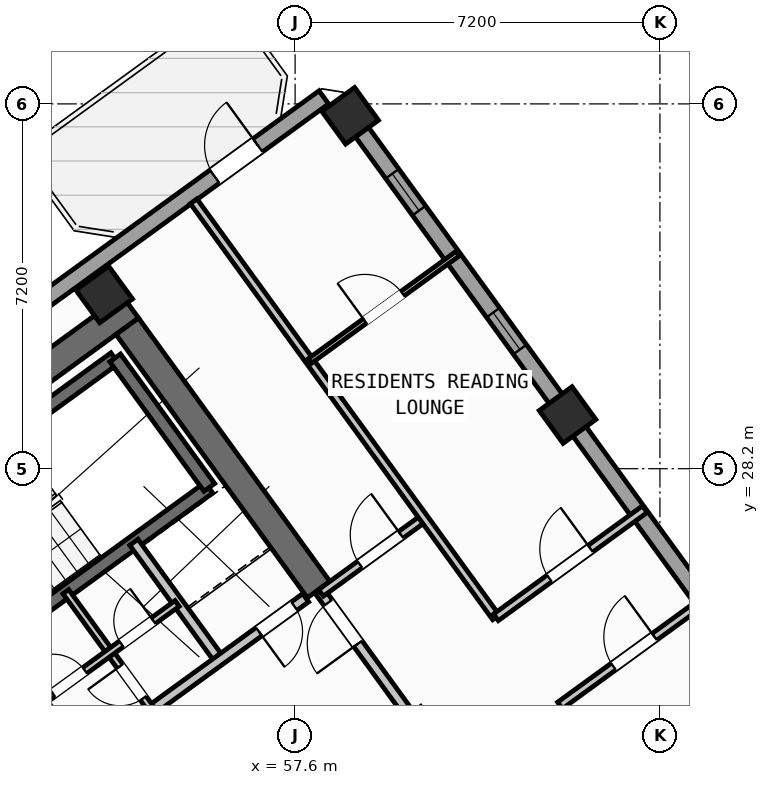
"""IFC4 building model, lengths in metres.
Left out: names, types, materials, properties, quantities, classifications, styles, units other than length and angle.
Written with IfcOpenShell. Run it as: python <this file> out.ifc"""

import sys

from ifc_helpers import new_model, si_unit, direction, frame, frame_2d, origin, origin_2d, place, context, subcontext, project, spatial, rectangle, hollow_rectangle, extrude, source, transform, mapped, element, fill, save


model = new_model("IFC4")
c1 = context("Model", 3, precision=1e-05, world=origin(), true_north=direction((0.0, 1.0)))
c2 = subcontext(c1, "Body", "Model", "MODEL_VIEW")
j1 = project(units=[si_unit("LENGTHUNIT", "METRE"), si_unit("PLANEANGLEUNIT", "RADIAN")], contexts=[c1])
p1 = place(None, origin())
s1 = spatial("IfcSite", under=j1, at=p1, CompositionType="ELEMENT")
p2 = place(p1, origin())
s2 = spatial("IfcBuilding", under=s1, at=p2, CompositionType="ELEMENT")
p3 = place(p2, frame((0.0, 0.0, 174.9)))
s3 = spatial("IfcBuildingStorey", under=s2, at=p3, CompositionType="ELEMENT", Elevation=174.9)
p4 = place(p3, frame((44.365, 24.142, 0.0), z_axis=(0.0, 0.0, 1.0), x_axis=(0.809024304885, 0.587775190107, 0.0)))
e1 = element("IfcWall", 1, at=p4, inside=s3, PredefinedType="SHEAR", context=c2, shape_type="SweptSolid", body=[
    extrude(rectangle(XDim=12.34, YDim=0.55, at=frame_2d((6.17, 0.0))), origin(), (0.0, 0.0, 1.0), 4.22),
])
p5 = place(p3, frame((58.064, 25.813, 0.0), z_axis=(0.0, 0.0, 1.0), x_axis=(-0.587764933797, 0.809031756236, 0.0)))
e2 = element("IfcWall", 2, at=p5, inside=s3, PredefinedType="SHEAR", context=c2, shape_type="SweptSolid", body=[
    extrude(rectangle(XDim=6.425, YDim=0.55, at=frame_2d((3.212, 0.0))), origin(), (0.0, 0.0, 1.0), 4.22),
])
m1 = source(origin(), c2, "Body", "SweptSolid", [
    extrude(hollow_rectangle(XDim=0.8, YDim=0.8, WallThickness=0.032, at=origin_2d()), origin(), (0.0, 0.0, 1.0), 4.5),
])
for number, where, z_axis, x_axis in (
    (3, (53.832, 31.638, 0.0), (0.0, 0.0, 1.0), (0.809, 0.588, 0.0)),
    (4, (62.977, 29.259, 0.0), (0.0, 0.0, 1.0), (0.809, 0.588, 0.0)),
    (5, (58.686, 35.165, 0.0), (0.0, 0.0, 1.0), (0.809, 0.588, 0.0)),
):
    element("IfcColumn", number, at=place(p3, frame(where, z_axis=z_axis, x_axis=x_axis)), inside=s3, PredefinedType="COLUMN", context=c2, shape_type="MappedRepresentation", body=[
        mapped(m1, transform((0.0, 0.0, 0.0), scale=1.0)),
    ])
p6 = place(p3, frame((43.938, 25.192, 0.0), z_axis=(0.0, 0.0, 1.0), x_axis=(0.809016324578, 0.587786174187, 0.0)))
e6 = element("IfcWall", 6, at=p6, inside=s3, PredefinedType="STANDARD", context=c2, shape_type="SweptSolid", body=[
    extrude(rectangle(XDim=17.587, YDim=0.32, at=frame_2d((8.794, 0.0))), origin(), (0.0, 0.0, 1.0), 4.22),
])
p7 = place(p6, frame((14.926, 0.0, 0.0)))
e7 = element("IfcOpeningElement", 7, at=p7, cuts=e6, PredefinedType="OPENING", context=c2, shape_type="SweptSolid", body=[
    extrude(rectangle(XDim=1.05, YDim=2.15, at=frame_2d((0.525, 1.075))), frame((0.0, 0.17, 0.0), z_axis=(0.0, -1.0, 0.0), x_axis=(1.0, 0.0, 0.0)), (0.0, 0.0, 1.0), 0.34),
])
p8 = place(p6, frame((2.606, 0.0, 0.8)))
e8 = element("IfcOpeningElement", 8, at=p8, cuts=e6, PredefinedType="OPENING", context=c2, shape_type="SweptSolid", body=[
    extrude(rectangle(XDim=2.1, YDim=1.55, at=frame_2d((1.05, 0.775))), frame((0.0, 0.17, 0.0), z_axis=(0.0, -1.0, 0.0), x_axis=(1.0, 0.0, 0.0)), (0.0, 0.0, 1.0), 0.34),
])
p9 = place(p6, frame((6.881, 0.0, 0.8)))
e9 = element("IfcOpeningElement", 9, at=p9, cuts=e6, PredefinedType="OPENING", context=c2, shape_type="SweptSolid", body=[
    extrude(rectangle(XDim=2.1, YDim=1.55, at=frame_2d((1.05, 0.775))), frame((0.0, 0.17, 0.0), z_axis=(0.0, -1.0, 0.0), x_axis=(1.0, 0.0, 0.0)), (0.0, 0.0, 1.0), 0.34),
])
p10 = place(p3, frame((58.455, 35.484, 0.0), z_axis=(0.0, 0.0, 1.0), x_axis=(0.587783625747, -0.809018176127, 0.0)))
e10 = element("IfcWall", 10, at=p10, inside=s3, PredefinedType="STANDARD", context=c2, shape_type="SweptSolid", body=[
    extrude(rectangle(XDim=21.587, YDim=0.32, at=frame_2d((10.794, 0.0))), origin(), (0.0, 0.0, 1.0), 2.395),
])
p11 = place(p10, frame((1.807, 0.0, 1.0)))
e11 = element("IfcOpeningElement", 11, at=p11, cuts=e10, PredefinedType="OPENING", context=c2, shape_type="SweptSolid", body=[
    extrude(rectangle(XDim=0.9, YDim=1.25, at=frame_2d((0.45, 0.625))), frame((0.0, 0.17, 0.0), z_axis=(0.0, -1.0, 0.0), x_axis=(1.0, 0.0, 0.0)), (0.0, 0.0, 1.0), 0.34),
])
p12 = place(p10, frame((5.195, 0.0, 1.0)))
e12 = element("IfcOpeningElement", 12, at=p12, cuts=e10, PredefinedType="OPENING", context=c2, shape_type="SweptSolid", body=[
    extrude(rectangle(XDim=0.9, YDim=1.25, at=frame_2d((0.45, 0.625))), frame((0.0, 0.17, 0.0), z_axis=(0.0, -1.0, 0.0), x_axis=(1.0, 0.0, 0.0)), (0.0, 0.0, 1.0), 0.34),
])
p13 = place(p10, frame((13.059, 0.0, 1.0)))
e13 = element("IfcOpeningElement", 13, at=p13, cuts=e10, PredefinedType="OPENING", context=c2, shape_type="SweptSolid", body=[
    extrude(rectangle(XDim=0.9, YDim=1.25, at=frame_2d((0.45, 0.625))), frame((0.0, 0.17, 0.0), z_axis=(0.0, -1.0, 0.0), x_axis=(1.0, 0.0, 0.0)), (0.0, 0.0, 1.0), 0.34),
])
p14 = place(p3, frame((48.006, 25.996, 0.0), z_axis=(0.0, 0.0, 1.0), x_axis=(0.80901903764, 0.587782439969, 0.0)))
e14 = element("IfcWall", 14, at=p14, inside=s3, PredefinedType="SHEAR", context=c2, shape_type="SweptSolid", body=[
    extrude(rectangle(XDim=7.46, YDim=0.26, at=frame_2d((3.73, 0.0))), origin(), (0.0, 0.0, 1.0), 4.22),
])
p15 = place(p3, frame((49.863, 23.44, 0.0), z_axis=(0.0, 0.0, 1.0), x_axis=(0.809003474932, 0.587803859759, 0.0)))
e15 = element("IfcWall", 15, at=p15, inside=s3, PredefinedType="SHEAR", context=c2, shape_type="SweptSolid", body=[
    extrude(rectangle(XDim=7.46, YDim=0.26, at=frame_2d((3.73, 0.0))), origin(), (0.0, 0.0, 1.0), 4.22),
])
p16 = place(p15, frame((0.36, 0.0, 0.0)))
e16 = element("IfcOpeningElement", 16, at=p16, cuts=e15, PredefinedType="OPENING", context=c2, shape_type="SweptSolid", body=[
    extrude(rectangle(XDim=0.86, YDim=2.05, at=frame_2d((0.43, 1.025))), frame((0.0, 0.14, 0.0), z_axis=(0.0, -1.0, 0.0), x_axis=(1.0, 0.0, 0.0)), (0.0, 0.0, 1.0), 0.28),
])
p17 = place(p3, frame((55.906, 27.831, 0.0), z_axis=(0.0, 0.0, 1.0), x_axis=(-0.587804123638, 0.809003283204, 0.0)))
e17 = element("IfcWall", 17, at=p17, inside=s3, PredefinedType="SHEAR", context=c2, shape_type="SweptSolid", body=[
    extrude(rectangle(XDim=3.16, YDim=0.26, at=frame_2d((1.58, 0.0))), origin(), (0.0, 0.0, 1.0), 4.22),
])
p18 = place(p3, frame((53.425, 22.468, 0.0), z_axis=(0.0, 0.0, 1.0), x_axis=(-0.5877230039, 0.809062216821, 0.0)))
e18 = element("IfcWall", 18, at=p18, inside=s3, PredefinedType="STANDARD", context=c2, shape_type="SweptSolid", body=[
    extrude(rectangle(XDim=2.88, YDim=0.2, at=frame_2d((1.44, 0.0))), origin(), (0.0, 0.0, 1.0), 4.21),
])
p19 = place(p3, frame((56.111, 24.419, 0.0), z_axis=(0.0, 0.0, 1.0), x_axis=(-0.58777848983, 0.809021907548, 0.0)))
e19 = element("IfcWall", 19, at=p19, inside=s3, PredefinedType="STANDARD", context=c2, shape_type="SweptSolid", body=[
    extrude(rectangle(XDim=2.88, YDim=0.2, at=frame_2d((1.44, 0.0))), origin(), (0.0, 0.0, 1.0), 4.21),
])
p20 = place(p3, frame((53.425, 22.468, 0.0), z_axis=(0.0, 0.0, 1.0), x_axis=(0.809024377198, 0.587775090574, 0.0)))
e20 = element("IfcWall", 20, at=p20, inside=s3, PredefinedType="STANDARD", context=c2, shape_type="SweptSolid", body=[
    extrude(rectangle(XDim=5.418, YDim=0.2, at=frame_2d((2.709, 0.0))), origin(), (0.0, 0.0, 1.0), 4.21),
])
p21 = place(p20, frame((4.28, 0.0, 0.0)))
e21 = element("IfcOpeningElement", 21, at=p21, cuts=e20, PredefinedType="OPENING", context=c2, shape_type="SweptSolid", body=[
    extrude(rectangle(XDim=0.86, YDim=2.05, at=frame_2d((0.43, 1.025))), frame((0.0, 0.11, 0.0), z_axis=(0.0, -1.0, 0.0), x_axis=(1.0, 0.0, 0.0)), (0.0, 0.0, 1.0), 0.22),
])
p22 = place(p20, frame((0.35, 0.0, 0.0)))
e22 = element("IfcOpeningElement", 22, at=p22, cuts=e20, PredefinedType="OPENING", context=c2, shape_type="SweptSolid", body=[
    extrude(rectangle(XDim=0.86, YDim=2.05, at=frame_2d((0.43, 1.025))), frame((0.0, 0.11, 0.0), z_axis=(0.0, -1.0, 0.0), x_axis=(1.0, 0.0, 0.0)), (0.0, 0.0, 1.0), 0.22),
])
p23 = place(p3, frame((54.768, 23.443, 0.0), z_axis=(0.0, 0.0, 1.0), x_axis=(-0.587736077749, 0.809052719489, 0.0)))
e23 = element("IfcWall", 23, at=p23, inside=s3, PredefinedType="PLUMBINGWALL", context=c2, shape_type="SweptSolid", body=[
    extrude(rectangle(XDim=1.4, YDim=0.14, at=frame_2d((0.7, 0.0))), origin(), (0.0, 0.0, 1.0), 4.21),
])
p24 = place(p23, frame((0.28, 0.0, 0.0)))
e24 = element("IfcOpeningElement", 24, at=p24, cuts=e23, PredefinedType="OPENING", context=c2, shape_type="SweptSolid", body=[
    extrude(rectangle(XDim=0.78, YDim=2.05, at=frame_2d((0.39, 1.025))), frame((0.0, 0.08, 0.0), z_axis=(0.0, -1.0, 0.0), x_axis=(1.0, 0.0, 0.0)), (0.0, 0.0, 1.0), 0.16),
])
p25 = place(p3, frame((53.945, 24.576, 0.0), z_axis=(0.0, 0.0, 1.0), x_axis=(-0.587897037186, 0.808935766095, 0.0)))
e25 = element("IfcWall", 25, at=p25, inside=s3, PredefinedType="PLUMBINGWALL", context=c2, shape_type="SweptSolid", body=[
    extrude(rectangle(XDim=1.48, YDim=0.14, at=frame_2d((0.74, 0.0))), origin(), (0.0, 0.0, 1.0), 4.21),
])
p26 = place(p3, frame((52.618, 23.612, 0.0), z_axis=(0.0, 0.0, 1.0), x_axis=(0.809009587469, 0.587795446889, 0.0)))
e26 = element("IfcWall", 26, at=p26, inside=s3, PredefinedType="PLUMBINGWALL", context=c2, shape_type="SweptSolid", body=[
    extrude(rectangle(XDim=3.28, YDim=0.14, at=frame_2d((1.64, 0.0))), origin(), (0.0, 0.0, 1.0), 4.21),
])
p27 = place(p26, frame((0.25, 0.0, 0.0)))
e27 = element("IfcOpeningElement", 27, at=p27, cuts=e26, PredefinedType="OPENING", context=c2, shape_type="SweptSolid", body=[
    extrude(rectangle(XDim=0.78, YDim=2.05, at=frame_2d((0.39, 1.025))), frame((0.0, 0.08, 0.0), z_axis=(0.0, -1.0, 0.0), x_axis=(1.0, 0.0, 0.0)), (0.0, 0.0, 1.0), 0.16),
])
p28 = place(p26, frame((1.92, 0.0, 0.0)))
e28 = element("IfcOpeningElement", 28, at=p28, cuts=e26, PredefinedType="OPENING", context=c2, shape_type="SweptSolid", body=[
    extrude(rectangle(XDim=0.78, YDim=2.05, at=frame_2d((0.39, 1.025))), frame((0.0, 0.08, 0.0), z_axis=(0.0, -1.0, 0.0), x_axis=(1.0, 0.0, 0.0)), (0.0, 0.0, 1.0), 0.16),
])
p29 = place(p3, frame((59.827, 23.386, 0.0), z_axis=(0.0, 0.0, 1.0), x_axis=(-0.587803840107, 0.809003489211, 0.0)))
e29 = element("IfcWall", 29, at=p29, inside=s3, PredefinedType="STANDARD", context=c2, shape_type="SweptSolid", body=[
    extrude(rectangle(XDim=2.96, YDim=0.2, at=frame_2d((1.48, 0.0))), origin(), (0.0, 0.0, 1.0), 2.395),
])
p30 = place(p29, frame((1.68, 0.0, 0.0)))
e30 = element("IfcOpeningElement", 30, at=p30, cuts=e29, PredefinedType="OPENING", context=c2, shape_type="SweptSolid", body=[
    extrude(rectangle(XDim=1.0, YDim=2.1, at=frame_2d((0.5, 1.05))), frame((0.0, 0.11, 0.0), z_axis=(0.0, -1.0, 0.0), x_axis=(1.0, 0.0, 0.0)), (0.0, 0.0, 1.0), 0.22),
])
p31 = place(p3, frame((58.111, 25.749, 0.0), z_axis=(0.0, 0.0, 1.0), x_axis=(0.809000999347, 0.58780726693, 0.0)))
e31 = element("IfcWall", 31, at=p31, inside=s3, PredefinedType="PARTITIONING", context=c2, shape_type="SweptSolid", body=[
    extrude(rectangle(XDim=2.51, YDim=0.16, at=frame_2d((1.255, 0.0))), origin(), (0.0, 0.0, 1.0), 3.695),
])
p32 = place(p31, frame((0.95, 0.0, 0.0)))
e32 = element("IfcOpeningElement", 32, at=p32, cuts=e31, PredefinedType="OPENING", context=c2, shape_type="SweptSolid", body=[
    extrude(rectangle(XDim=1.0, YDim=2.1, at=frame_2d((0.5, 1.05))), frame((0.0, 0.09, 0.0), z_axis=(0.0, -1.0, 0.0), x_axis=(1.0, 0.0, 0.0)), (0.0, 0.0, 1.0), 0.18),
])
p33 = place(p3, frame((68.353, 15.922, 0.0), z_axis=(0.0, 0.0, 1.0), x_axis=(-0.587784007866, 0.809017898502, 0.0)))
e33 = element("IfcWall", 33, at=p33, inside=s3, PredefinedType="PARTITIONING", context=c2, shape_type="SweptSolid", body=[
    extrude(rectangle(XDim=9.4, YDim=0.16, at=frame_2d((4.7, 0.0))), origin(), (0.0, 0.0, 1.0), 4.21),
])
p34 = place(p3, frame((61.564, 25.266, 0.0), z_axis=(0.0, 0.0, 1.0), x_axis=(-0.587792629712, 0.809011634314, 0.0)))
e34 = element("IfcWall", 34, at=p34, inside=s3, PredefinedType="PARTITIONING", context=c2, shape_type="SweptSolid", body=[
    extrude(rectangle(XDim=10.15, YDim=0.16, at=frame_2d((5.075, 0.0))), origin(), (0.0, 0.0, 1.0), 4.21),
])
p35 = place(p3, frame((62.828, 23.527, 0.0), z_axis=(0.0, 0.0, 1.0), x_axis=(0.809003564202, 0.587803736896, 0.0)))
e35 = element("IfcWall", 35, at=p35, inside=s3, PredefinedType="PARTITIONING", context=c2, shape_type="SweptSolid", body=[
    extrude(rectangle(XDim=3.63, YDim=0.16, at=frame_2d((1.815, 0.0))), origin(), (0.0, 0.0, 1.0), 4.21),
])
p36 = place(p35, frame((1.305, 0.0, 0.0)))
e36 = element("IfcOpeningElement", 36, at=p36, cuts=e35, PredefinedType="OPENING", context=c2, shape_type="SweptSolid", body=[
    extrude(rectangle(XDim=1.0, YDim=2.1, at=frame_2d((0.5, 1.05))), frame((0.0, 0.09, 0.0), z_axis=(0.0, -1.0, 0.0), x_axis=(1.0, 0.0, 0.0)), (0.0, 0.0, 1.0), 0.18),
])
p37 = place(p3, frame((61.564, 25.266, 0.0), z_axis=(0.0, 0.0, 1.0), x_axis=(0.809012309495, 0.587791700422, 0.0)))
e37 = element("IfcWall", 37, at=p37, inside=s3, PredefinedType="PARTITIONING", context=c2, shape_type="SweptSolid", body=[
    extrude(rectangle(XDim=3.63, YDim=0.16, at=frame_2d((1.815, 0.0))), origin(), (0.0, 0.0, 1.0), 4.21),
])
p38 = place(p37, frame((1.305, 0.0, 0.0)))
e38 = element("IfcOpeningElement", 38, at=p38, cuts=e37, PredefinedType="OPENING", context=c2, shape_type="SweptSolid", body=[
    extrude(rectangle(XDim=1.0, YDim=2.1, at=frame_2d((0.5, 1.05))), frame((0.0, 0.09, 0.0), z_axis=(0.0, -1.0, 0.0), x_axis=(1.0, 0.0, 0.0)), (0.0, 0.0, 1.0), 0.18),
])
p39 = place(p3, frame((57.889, 30.324, 0.0), z_axis=(0.0, 0.0, 1.0), x_axis=(0.809005039917, 0.58780170584, 0.0)))
e39 = element("IfcWall", 39, at=p39, inside=s3, PredefinedType="PARTITIONING", context=c2, shape_type="SweptSolid", body=[
    extrude(rectangle(XDim=3.61, YDim=0.11, at=frame_2d((1.805, 0.0))), origin(), (0.0, 0.0, 1.0), 4.21),
])
p40 = place(p39, frame((1.345, 0.0, 0.0)))
e40 = element("IfcOpeningElement", 40, at=p40, cuts=e39, PredefinedType="OPENING", context=c2, shape_type="SweptSolid", body=[
    extrude(rectangle(XDim=0.92, YDim=2.08, at=frame_2d((0.46, 1.04))), frame((0.0, 0.065, 0.0), z_axis=(0.0, -1.0, 0.0), x_axis=(1.0, 0.0, 0.0)), (0.0, 0.0, 1.0), 0.13),
])
m2 = source(origin(), c2, "Body", "SweptSolid", [
    extrude(rectangle(XDim=1.05, YDim=2.15, at=frame_2d((0.525, 1.075))), frame((0.0, 0.025, 0.0), z_axis=(0.0, -1.0, 0.0), x_axis=(1.0, 0.0, 0.0)), (0.0, 0.0, 1.0), 0.05),
])
p41 = place(p7, origin())
e41 = element("IfcDoor", 41, at=p41, inside=s3, OperationType="SINGLE_SWING_RIGHT", PredefinedType="DOOR", context=c2, shape_type="MappedRepresentation", body=[
    mapped(m2, transform((0.0, 0.0, 0.0), scale=1.0)),
])
fill(e7, e41)
m3 = source(origin(), c2, "Body", "SweptSolid", [
    extrude(rectangle(XDim=0.9, YDim=1.25, at=frame_2d((0.45, 0.625))), frame((0.0, 0.03, 0.0), z_axis=(0.0, -1.0, 0.0), x_axis=(1.0, 0.0, 0.0)), (0.0, 0.0, 1.0), 0.06),
])
p42 = place(p11, origin())
e42 = element("IfcWindow", 42, at=p42, inside=s3, PartitioningType="SINGLE_PANEL", PredefinedType="WINDOW", context=c2, shape_type="MappedRepresentation", body=[
    mapped(m3, transform((0.0, 0.0, 0.0), scale=1.0)),
])
fill(e11, e42)
p43 = place(p12, origin())
e43 = element("IfcWindow", 43, at=p43, inside=s3, PartitioningType="SINGLE_PANEL", PredefinedType="WINDOW", context=c2, shape_type="MappedRepresentation", body=[
    mapped(m3, transform((0.0, 0.0, 0.0), scale=1.0)),
])
fill(e12, e43)
m4 = source(origin(), c2, "Body", "SweptSolid", [
    extrude(rectangle(XDim=0.86, YDim=2.05, at=frame_2d((0.43, 1.025))), frame((0.0, 0.025, 0.0), z_axis=(0.0, -1.0, 0.0), x_axis=(1.0, 0.0, 0.0)), (0.0, 0.0, 1.0), 0.05),
])
p44 = place(p21, frame((0.86, 0.0, 0.0), z_axis=(0.0, 0.0, 1.0), x_axis=(-1.0, 0.0, 0.0)))
e44 = element("IfcDoor", 44, at=p44, inside=s3, OperationType="SINGLE_SWING_RIGHT", PredefinedType="DOOR", context=c2, shape_type="MappedRepresentation", body=[
    mapped(m4, transform((0.0, 0.0, 0.0), scale=1.0)),
])
fill(e21, e44)
m5 = source(origin(), c2, "Body", "SweptSolid", [
    extrude(rectangle(XDim=0.78, YDim=2.05, at=frame_2d((0.39, 1.025))), frame((0.0, 0.025, 0.0), z_axis=(0.0, -1.0, 0.0), x_axis=(1.0, 0.0, 0.0)), (0.0, 0.0, 1.0), 0.05),
])
p45 = place(p24, origin())
e45 = element("IfcDoor", 45, at=p45, inside=s3, OperationType="SINGLE_SWING_RIGHT", PredefinedType="DOOR", context=c2, shape_type="MappedRepresentation", body=[
    mapped(m5, transform((0.0, 0.0, 0.0), scale=1.0)),
])
fill(e24, e45)
p46 = place(p27, origin())
e46 = element("IfcDoor", 46, at=p46, inside=s3, OperationType="SINGLE_SWING_LEFT", PredefinedType="DOOR", context=c2, shape_type="MappedRepresentation", body=[
    mapped(m5, transform((0.0, 0.0, 0.0), scale=1.0)),
])
fill(e27, e46)
p47 = place(p28, origin())
e47 = element("IfcDoor", 47, at=p47, inside=s3, OperationType="SINGLE_SWING_RIGHT", PredefinedType="DOOR", context=c2, shape_type="MappedRepresentation", body=[
    mapped(m5, transform((0.0, 0.0, 0.0), scale=1.0)),
])
fill(e28, e47)
m6 = source(origin(), c2, "Body", "SweptSolid", [
    extrude(rectangle(XDim=1.0, YDim=2.1, at=frame_2d((0.5, 1.05))), frame((0.0, 0.025, 0.0), z_axis=(0.0, -1.0, 0.0), x_axis=(1.0, 0.0, 0.0)), (0.0, 0.0, 1.0), 0.05),
])
p48 = place(p32, origin())
e48 = element("IfcDoor", 48, at=p48, inside=s3, OperationType="SINGLE_SWING_RIGHT", PredefinedType="DOOR", context=c2, shape_type="MappedRepresentation", body=[
    mapped(m6, transform((0.0, 0.0, 0.0), scale=1.0)),
])
fill(e32, e48)
p49 = place(p30, origin())
e49 = element("IfcDoor", 49, at=p49, inside=s3, OperationType="SINGLE_SWING_LEFT", PredefinedType="DOOR", context=c2, shape_type="MappedRepresentation", body=[
    mapped(m6, transform((0.0, 0.0, 0.0), scale=1.0)),
])
fill(e30, e49)
p50 = place(p38, origin())
e50 = element("IfcDoor", 50, at=p50, inside=s3, OperationType="SINGLE_SWING_RIGHT", PredefinedType="DOOR", context=c2, shape_type="MappedRepresentation", body=[
    mapped(m6, transform((0.0, 0.0, 0.0), scale=1.0)),
])
fill(e38, e50)
m7 = source(origin(), c2, "Body", "SweptSolid", [
    extrude(rectangle(XDim=0.92, YDim=2.08, at=frame_2d((0.46, 1.04))), frame((0.0, 0.025, 0.0), z_axis=(0.0, -1.0, 0.0), x_axis=(1.0, 0.0, 0.0)), (0.0, 0.0, 1.0), 0.05),
])
p51 = place(p40, origin())
e51 = element("IfcDoor", 51, at=p51, inside=s3, OperationType="SINGLE_SWING_LEFT", PredefinedType="DOOR", context=c2, shape_type="MappedRepresentation", body=[
    mapped(m7, transform((0.0, 0.0, 0.0), scale=1.0)),
])
fill(e40, e51)
p52 = place(p36, origin())
e52 = element("IfcDoor", 52, at=p52, inside=s3, OperationType="SINGLE_SWING_RIGHT", PredefinedType="DOOR", context=c2, shape_type="MappedRepresentation", body=[
    mapped(m6, transform((0.0, 0.0, 0.0), scale=1.0)),
])
fill(e36, e52)
save(model, sys.argv[1])
